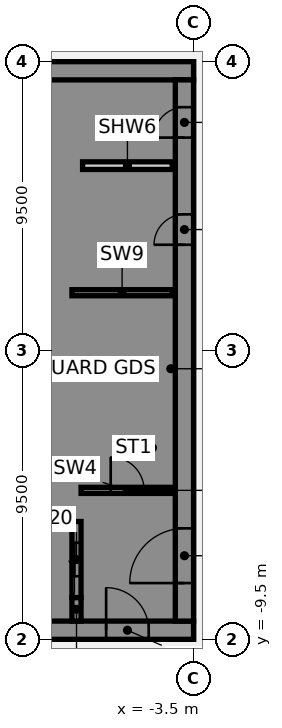
"""IFC4 building model, lengths in metres.
Left out: names, types, materials, properties, quantities, classifications, styles, units other than length and angle.
Written with IfcOpenShell. Run it as: python <this file> out.ifc"""

import sys

from ifc_helpers import new_model, si_unit, direction, frame, frame_2d, origin, place, context, subcontext, project, spatial, polyline, rectangle, outline, extrude, element, fill, save


model = new_model("IFC4")
c1 = context("Model", 3, precision=1e-05, world=origin(), true_north=direction((0.0, 1.0)))
c2 = subcontext(c1, "Body", "Model", "MODEL_VIEW")
j1 = project(units=[si_unit("LENGTHUNIT", "METRE"), si_unit("PLANEANGLEUNIT", "RADIAN")], contexts=[c1])
p1 = place(None, origin())
s1 = spatial("IfcSite", under=j1, at=p1, CompositionType="ELEMENT")
p2 = place(p1, origin())
s2 = spatial("IfcBuilding", under=s1, at=p2, CompositionType="ELEMENT")
p3 = place(p2, frame((0.0, 0.0, 87.25)))
s3 = spatial("IfcBuildingStorey", under=s2, at=p3, CompositionType="ELEMENT", Elevation=87.25)
p4 = place(p3, frame((-16.5, -9.2, 0.0), z_axis=(0.0, 0.0, 1.0), x_axis=(1.0, 0.0, 0.0)))
e1 = element("IfcWall", 1, at=p4, inside=s3, PredefinedType="SHEAR", context=c2, shape_type="SweptSolid", body=[
    extrude(rectangle(XDim=13.0, YDim=0.6, at=frame_2d((6.5, 0.0))), origin(), (0.0, 0.0, 1.0), 3.61),
])
p5 = place(p4, frame((4.15, 0.0, 0.0)))
e2 = element("IfcOpeningElement", 2, at=p5, cuts=e1, PredefinedType="OPENING", context=c2, shape_type="SweptSolid", body=[
    extrude(rectangle(XDim=1.4, YDim=2.1, at=frame_2d((0.7, 1.05))), frame((0.0, 0.31, 0.0), z_axis=(0.0, -1.0, 0.0), x_axis=(1.0, 0.0, 0.0)), (0.0, 0.0, 1.0), 0.62),
])
p6 = place(p4, frame((10.125, 0.0, 0.0)))
e3 = element("IfcOpeningElement", 3, at=p6, cuts=e1, PredefinedType="OPENING", context=c2, shape_type="SweptSolid", body=[
    extrude(rectangle(XDim=1.4, YDim=2.1, at=frame_2d((0.7, 1.05))), frame((0.0, 0.31, 0.0), z_axis=(0.0, -1.0, 0.0), x_axis=(1.0, 0.0, 0.0)), (0.0, 0.0, 1.0), 0.62),
])
p7 = place(p3, frame((-16.5, 9.2, 0.0), z_axis=(0.0, 0.0, 1.0), x_axis=(1.0, 0.0, 0.0)))
e4 = element("IfcWall", 4, at=p7, inside=s3, PredefinedType="SHEAR", context=c2, shape_type="SweptSolid", body=[
    extrude(rectangle(XDim=13.0, YDim=0.6, at=frame_2d((6.5, 0.0))), origin(), (0.0, 0.0, 1.0), 3.61),
])
p8 = place(p3, origin())
e5 = element("IfcWall", 5, at=p8, inside=s3, PredefinedType="SHEAR", context=c2, shape_type="SweptSolid", body=[
    extrude(outline(polyline([(-9.8, -5.375), (-9.8, -5.625), (-7.5, -5.625), (-7.2, -5.625), (-7.2, 8.9), (-7.5, 8.9), (-9.8, 8.9), (-9.8, 8.125), (-7.5, 8.125), (-7.5, 5.625), (-9.8, 5.625), (-9.8, 5.375), (-7.5, 5.375), (-7.5, 2.875), (-9.8, 2.875), (-9.8, 2.625), (-7.5, 2.625), (-7.5, 0.125), (-9.8, 0.125), (-9.8, -0.125), (-7.5, -0.125), (-7.5, -2.625), (-9.8, -2.625), (-9.8, -2.875), (-7.5, -2.875), (-7.5, -5.375), (-9.8, -5.375)])), origin(), (0.0, 0.0, 1.0), 3.61),
])
p9 = place(p3, origin())
e6 = element("IfcWall", 6, at=p9, inside=s3, PredefinedType="SHEAR", context=c2, shape_type="SweptSolid", body=[
    extrude(outline(polyline([(-7.5, -8.125), (-9.55, -8.125), (-9.55, -5.625), (-9.8, -5.625), (-9.8, -8.125), (-9.8, -8.9), (-7.5, -8.9), (-7.5, -8.125)])), origin(), (0.0, 0.0, 1.0), 3.61),
])
p10 = place(p3, frame((-7.35, -8.9, 0.0), z_axis=(0.0, 0.0, 1.0), x_axis=(0.0, 1.0, 0.0)))
e7 = element("IfcWall", 7, at=p10, inside=s3, PredefinedType="SHEAR", context=c2, shape_type="SweptSolid", body=[
    extrude(rectangle(XDim=0.775, YDim=0.3, at=frame_2d((0.387, 0.0))), origin(), (0.0, 0.0, 1.0), 3.61),
])
p11 = place(p3, frame((-7.5, 1.9, 0.0), z_axis=(0.0, 0.0, 1.0), x_axis=(1.0, 0.0, 0.0)))
e8 = element("IfcWall", 8, at=p11, inside=s3, PredefinedType="SHEAR", context=c2, shape_type="SweptSolid", body=[
    extrude(rectangle(XDim=3.3, YDim=0.2, at=frame_2d((1.65, 0.0))), origin(), (0.0, 0.0, 1.0), 3.61),
])
p12 = place(p3, frame((-7.35, -8.125, 0.0), z_axis=(0.0, 0.0, 1.0), x_axis=(0.0, 1.0, 0.0)))
e9 = element("IfcWall", 9, at=p12, inside=s3, PredefinedType="SHEAR", context=c2, shape_type="SweptSolid", body=[
    extrude(rectangle(XDim=2.5, YDim=0.3, at=frame_2d((1.25, 0.0))), origin(), (0.0, 0.0, 1.0), 3.61),
])
p13 = place(p12, frame((0.7, 0.0, 0.0)))
e10 = element("IfcOpeningElement", 10, at=p13, cuts=e9, PredefinedType="OPENING", context=c2, shape_type="SweptSolid", body=[
    extrude(rectangle(XDim=1.1, YDim=2.1, at=frame_2d((0.55, 1.05))), frame((0.0, 0.16, 0.0), z_axis=(0.0, -1.0, 0.0), x_axis=(1.0, 0.0, 0.0)), (0.0, 0.0, 1.0), 0.32),
])
p14 = place(p3, frame((-3.8, -8.9, 0.0), z_axis=(0.0, 0.0, 1.0), x_axis=(0.0, 1.0, 0.0)))
e11 = element("IfcWall", 11, at=p14, inside=s3, PredefinedType="SHEAR", context=c2, shape_type="SweptSolid", body=[
    extrude(rectangle(XDim=17.8, YDim=0.6, at=frame_2d((8.9, 0.0))), origin(), (0.0, 0.0, 1.0), 3.61),
])
p15 = place(p14, frame((1.25, 0.0, 0.0)))
e12 = element("IfcOpeningElement", 12, at=p15, cuts=e11, PredefinedType="OPENING", context=c2, shape_type="SweptSolid", body=[
    extrude(rectangle(XDim=1.8, YDim=2.1, at=frame_2d((0.9, 1.05))), frame((0.0, 0.31, 0.0), z_axis=(0.0, -1.0, 0.0), x_axis=(1.0, 0.0, 0.0)), (0.0, 0.0, 1.0), 0.62),
])
p16 = place(p14, frame((12.377, 0.0, 0.0)))
e13 = element("IfcOpeningElement", 13, at=p16, cuts=e11, PredefinedType="OPENING", context=c2, shape_type="SweptSolid", body=[
    extrude(rectangle(XDim=1.0, YDim=2.1, at=frame_2d((0.5, 1.05))), frame((0.0, 0.31, 0.0), z_axis=(0.0, -1.0, 0.0), x_axis=(1.0, 0.0, 0.0)), (0.0, 0.0, 1.0), 0.62),
])
p17 = place(p14, frame((15.903, 0.0, 0.0)))
e14 = element("IfcOpeningElement", 14, at=p17, cuts=e11, PredefinedType="OPENING", context=c2, shape_type="SweptSolid", body=[
    extrude(rectangle(XDim=1.0, YDim=2.1, at=frame_2d((0.5, 1.05))), frame((0.0, 0.31, 0.0), z_axis=(0.0, -1.0, 0.0), x_axis=(1.0, 0.0, 0.0)), (0.0, 0.0, 1.0), 0.62),
])
p18 = place(p3, frame((-7.15, 6.08, 0.0), z_axis=(0.0, 0.0, 1.0), x_axis=(1.0, 0.0, 0.0)))
e15 = element("IfcWall", 15, at=p18, inside=s3, PredefinedType="PARTITIONING", context=c2, shape_type="SweptSolid", body=[
    extrude(rectangle(XDim=2.95, YDim=0.25, at=frame_2d((1.475, 0.0))), origin(), (0.0, 0.0, 1.0), 3.61),
])
p19 = place(p3, frame((-7.2, -4.6, 0.0), z_axis=(0.0, 0.0, 1.0), x_axis=(1.0, 0.0, 0.0)))
e16 = element("IfcWall", 16, at=p19, inside=s3, PredefinedType="SHEAR", context=c2, shape_type="SweptSolid", body=[
    extrude(rectangle(XDim=3.1, YDim=0.2, at=frame_2d((1.55, 0.0))), origin(), (0.0, 0.0, 1.0), 3.61),
])
p20 = place(p19, frame((0.975, 0.0, 0.0)))
e17 = element("IfcOpeningElement", 17, at=p20, cuts=e16, PredefinedType="OPENING", context=c2, shape_type="SweptSolid", body=[
    extrude(rectangle(XDim=1.1, YDim=2.1, at=frame_2d((0.55, 1.05))), frame((0.0, 0.11, 0.0), z_axis=(0.0, -1.0, 0.0), x_axis=(1.0, 0.0, 0.0)), (0.0, 0.0, 1.0), 0.22),
])
p21 = place(p6, origin())
e18 = element("IfcDoor", 18, at=p21, inside=s3, OperationType="SINGLE_SWING_LEFT", PredefinedType="DOOR", context=c2, shape_type="SweptSolid", body=[
    extrude(rectangle(XDim=1.4, YDim=2.1, at=frame_2d((0.7, 1.05))), frame((0.0, 0.025, 0.0), z_axis=(0.0, -1.0, 0.0), x_axis=(1.0, 0.0, 0.0)), (0.0, 0.0, 1.0), 0.05),
])
fill(e3, e18)
p22 = place(p15, origin())
e19 = element("IfcDoor", 19, at=p22, inside=s3, OperationType="SINGLE_SWING_LEFT", PredefinedType="DOOR", context=c2, shape_type="SweptSolid", body=[
    extrude(rectangle(XDim=1.8, YDim=2.1, at=frame_2d((0.9, 1.05))), frame((0.0, 0.025, 0.0), z_axis=(0.0, -1.0, 0.0), x_axis=(1.0, 0.0, 0.0)), (0.0, 0.0, 1.0), 0.05),
])
fill(e12, e19)
p23 = place(p16, origin())
e20 = element("IfcDoor", 20, at=p23, inside=s3, OperationType="SINGLE_SWING_LEFT", PredefinedType="DOOR", context=c2, shape_type="SweptSolid", body=[
    extrude(rectangle(XDim=1.0, YDim=2.1, at=frame_2d((0.5, 1.05))), frame((0.0, 0.275, 0.0), z_axis=(0.0, -1.0, 0.0), x_axis=(1.0, 0.0, 0.0)), (0.0, 0.0, 1.0), 0.05),
])
fill(e13, e20)
p24 = place(p17, origin())
e21 = element("IfcDoor", 21, at=p24, inside=s3, OperationType="SINGLE_SWING_LEFT", PredefinedType="DOOR", context=c2, shape_type="SweptSolid", body=[
    extrude(rectangle(XDim=1.0, YDim=2.1, at=frame_2d((0.5, 1.05))), frame((0.0, 0.275, 0.0), z_axis=(0.0, -1.0, 0.0), x_axis=(1.0, 0.0, 0.0)), (0.0, 0.0, 1.0), 0.05),
])
fill(e14, e21)
p25 = place(p20, origin())
e22 = element("IfcDoor", 22, at=p25, inside=s3, OperationType="SINGLE_SWING_LEFT", PredefinedType="DOOR", context=c2, shape_type="SweptSolid", body=[
    extrude(rectangle(XDim=1.1, YDim=2.1, at=frame_2d((0.55, 1.05))), frame((0.0, 0.025, 0.0), z_axis=(0.0, -1.0, 0.0), x_axis=(1.0, 0.0, 0.0)), (0.0, 0.0, 1.0), 0.05),
])
fill(e17, e22)
p26 = place(p13, origin())
e23 = element("IfcDoor", 23, at=p26, inside=s3, OperationType="SLIDING_TO_LEFT", PredefinedType="DOOR", context=c2, shape_type="SweptSolid", body=[
    extrude(rectangle(XDim=1.1, YDim=2.1, at=frame_2d((0.55, 1.05))), frame((0.0, 0.025, 0.0), z_axis=(0.0, -1.0, 0.0), x_axis=(1.0, 0.0, 0.0)), (0.0, 0.0, 1.0), 0.05),
])
fill(e10, e23)
save(model, sys.argv[1])
